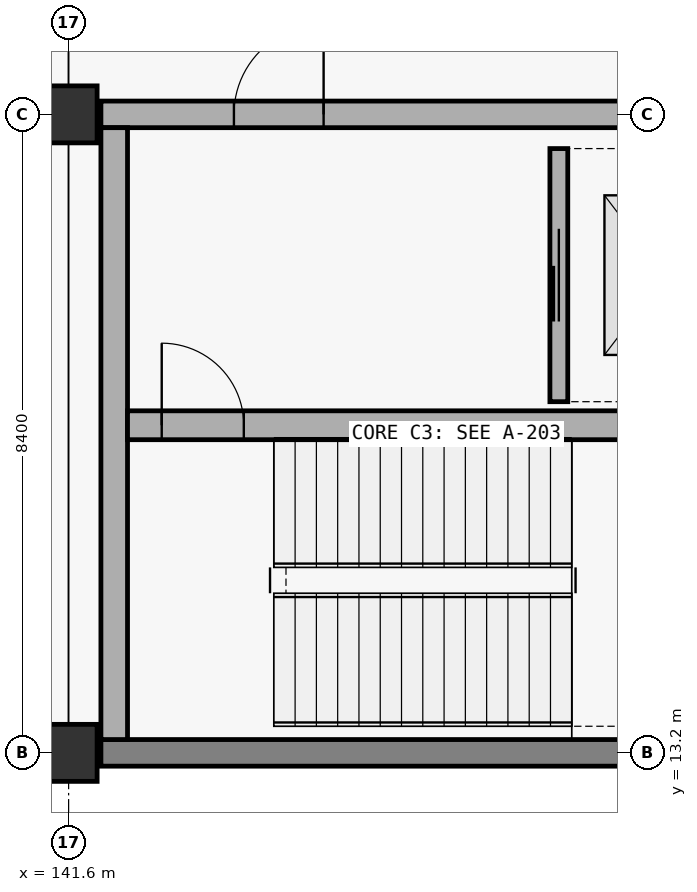
"""IFC4 building model, lengths in metres.
Left out: names, types, materials, properties, quantities, classifications, styles, units other than length and angle.
Written with IfcOpenShell. Run it as: python <this file> out.ifc"""

import sys

from ifc_helpers import new_model, si_unit, direction, frame, frame_2d, origin, origin_2d, place, context, subcontext, project, spatial, rectangle, extrude, element, fill, save


model = new_model("IFC4")
c1 = context("Model", 3, precision=1e-05, world=origin(), true_north=direction((0.0, 1.0)))
c2 = subcontext(c1, "Body", "Model", "MODEL_VIEW")
j1 = project(units=[si_unit("LENGTHUNIT", "METRE"), si_unit("PLANEANGLEUNIT", "RADIAN")], contexts=[c1])
p1 = place(None, origin())
s1 = spatial("IfcSite", under=j1, at=p1, CompositionType="ELEMENT")
p2 = place(p1, origin())
s2 = spatial("IfcBuilding", under=s1, at=p2, CompositionType="ELEMENT")
p3 = place(p2, frame((0.0, 0.0, 15.6)))
s3 = spatial("IfcBuildingStorey", under=s2, at=p3, CompositionType="ELEMENT", Elevation=15.6)
for number, where, z_axis, x_axis in (
    (1, (141.6, 13.2, 0.0), (0.0, 0.0, 1.0), (1.0, 0.0, 0.0)),
    (2, (141.6, 21.6, 0.0), (0.0, 0.0, 1.0), (1.0, 0.0, 0.0)),
):
    element("IfcColumn", number, at=place(p3, frame(where, z_axis=z_axis, x_axis=x_axis)), inside=s3, PredefinedType="COLUMN", context=c2, shape_type="SweptSolid", body=[
        extrude(rectangle(XDim=0.75, YDim=0.75, at=origin_2d()), origin(), (0.0, 0.0, 1.0), 5.1),
    ])
p4 = place(p3, frame((151.375, 13.2, 0.0), z_axis=(0.0, 0.0, 1.0), x_axis=(-1.0, 0.0, 0.0)))
e3 = element("IfcWall", 3, at=p4, inside=s3, PredefinedType="SHEAR", context=c2, shape_type="SweptSolid", body=[
    extrude(rectangle(XDim=9.35, YDim=0.35, at=frame_2d((4.675, 0.0))), origin(), (0.0, 0.0, 1.0), 5.1),
])
p5 = place(p3, frame((142.025, 21.6, 0.0), z_axis=(0.0, 0.0, 1.0), x_axis=(1.0, 0.0, 0.0)))
e4 = element("IfcWall", 4, at=p5, inside=s3, PredefinedType="SHEAR", context=c2, shape_type="SweptSolid", body=[
    extrude(rectangle(XDim=9.35, YDim=0.35, at=frame_2d((4.675, 0.0))), origin(), (0.0, 0.0, 1.0), 5.1),
])
p6 = place(p5, frame((1.75, 0.0, 0.0)))
e5 = element("IfcOpeningElement", 5, at=p6, cuts=e4, PredefinedType="OPENING", context=c2, shape_type="SweptSolid", body=[
    extrude(rectangle(XDim=1.18, YDim=2.24, at=frame_2d((0.59, 1.12))), frame((0.0, 0.185, 0.0), z_axis=(0.0, -1.0, 0.0), x_axis=(1.0, 0.0, 0.0)), (0.0, 0.0, 1.0), 0.37),
])
p7 = place(p3, frame((142.2, 13.375, 0.0), z_axis=(0.0, 0.0, 1.0), x_axis=(0.0, 1.0, 0.0)))
e6 = element("IfcWall", 6, at=p7, inside=s3, PredefinedType="SHEAR", context=c2, shape_type="SweptSolid", body=[
    extrude(rectangle(XDim=8.05, YDim=0.35, at=frame_2d((4.025, 0.0))), origin(), (0.0, 0.0, 1.0), 5.1),
])
p8 = place(p3, frame((142.375, 17.51, 0.0), z_axis=(0.0, 0.0, 1.0), x_axis=(1.0, 0.0, 0.0)))
e7 = element("IfcWall", 7, at=p8, inside=s3, PredefinedType="SHEAR", context=c2, shape_type="SweptSolid", body=[
    extrude(rectangle(XDim=8.65, YDim=0.38, at=frame_2d((4.325, 0.0))), origin(), (0.0, 0.0, 1.0), 5.1),
])
p9 = place(p8, frame((0.45, 0.0, 0.0)))
e8 = element("IfcOpeningElement", 8, at=p9, cuts=e7, PredefinedType="OPENING", context=c2, shape_type="SweptSolid", body=[
    extrude(rectangle(XDim=1.08, YDim=2.18, at=frame_2d((0.54, 1.09))), frame((0.0, 0.2, 0.0), z_axis=(0.0, -1.0, 0.0), x_axis=(1.0, 0.0, 0.0)), (0.0, 0.0, 1.0), 0.4),
])
p10 = place(p3, frame((148.05, 17.82, 0.0), z_axis=(0.0, 0.0, 1.0), x_axis=(0.0, 1.0, 0.0)))
e9 = element("IfcWall", 9, at=p10, inside=s3, PredefinedType="PARTITIONING", context=c2, shape_type="SweptSolid", body=[
    extrude(rectangle(XDim=3.33, YDim=0.235, at=frame_2d((1.665, 0.0))), origin(), (0.0, 0.0, 1.0), 4.72),
])
p11 = place(p10, frame((1.055, 0.0, 0.0)))
e10 = element("IfcOpeningElement", 10, at=p11, cuts=e9, PredefinedType="OPENING", context=c2, shape_type="SweptSolid", body=[
    extrude(rectangle(XDim=1.22, YDim=2.24, at=frame_2d((0.61, 1.12))), frame((0.0, 0.127, 0.0), z_axis=(0.0, -1.0, 0.0), x_axis=(1.0, 0.0, 0.0)), (0.0, 0.0, 1.0), 0.255),
])
p12 = place(p9, origin())
e11 = element("IfcDoor", 11, at=p12, inside=s3, OperationType="SINGLE_SWING_LEFT", PredefinedType="DOOR", context=c2, shape_type="SweptSolid", body=[
    extrude(rectangle(XDim=1.08, YDim=2.18, at=frame_2d((0.54, 1.09))), frame((0.0, 0.025, 0.0), z_axis=(0.0, -1.0, 0.0), x_axis=(1.0, 0.0, 0.0)), (0.0, 0.0, 1.0), 0.05),
])
fill(e8, e11)
p13 = place(p6, origin())
e12 = element("IfcDoor", 12, at=p13, inside=s3, OperationType="SINGLE_SWING_RIGHT", PredefinedType="DOOR", context=c2, shape_type="SweptSolid", body=[
    extrude(rectangle(XDim=1.18, YDim=2.24, at=frame_2d((0.59, 1.12))), frame((0.0, 0.025, 0.0), z_axis=(0.0, -1.0, 0.0), x_axis=(1.0, 0.0, 0.0)), (0.0, 0.0, 1.0), 0.05),
])
fill(e5, e12)
p14 = place(p11, origin())
e13 = element("IfcDoor", 13, at=p14, inside=s3, OperationType="SLIDING_TO_RIGHT", PredefinedType="DOOR", context=c2, shape_type="SweptSolid", body=[
    extrude(rectangle(XDim=1.22, YDim=2.24, at=frame_2d((0.61, 1.12))), frame((0.0, 0.025, 0.0), z_axis=(0.0, -1.0, 0.0), x_axis=(1.0, 0.0, 0.0)), (0.0, 0.0, 1.0), 0.05),
])
fill(e10, e13)
save(model, sys.argv[1])
